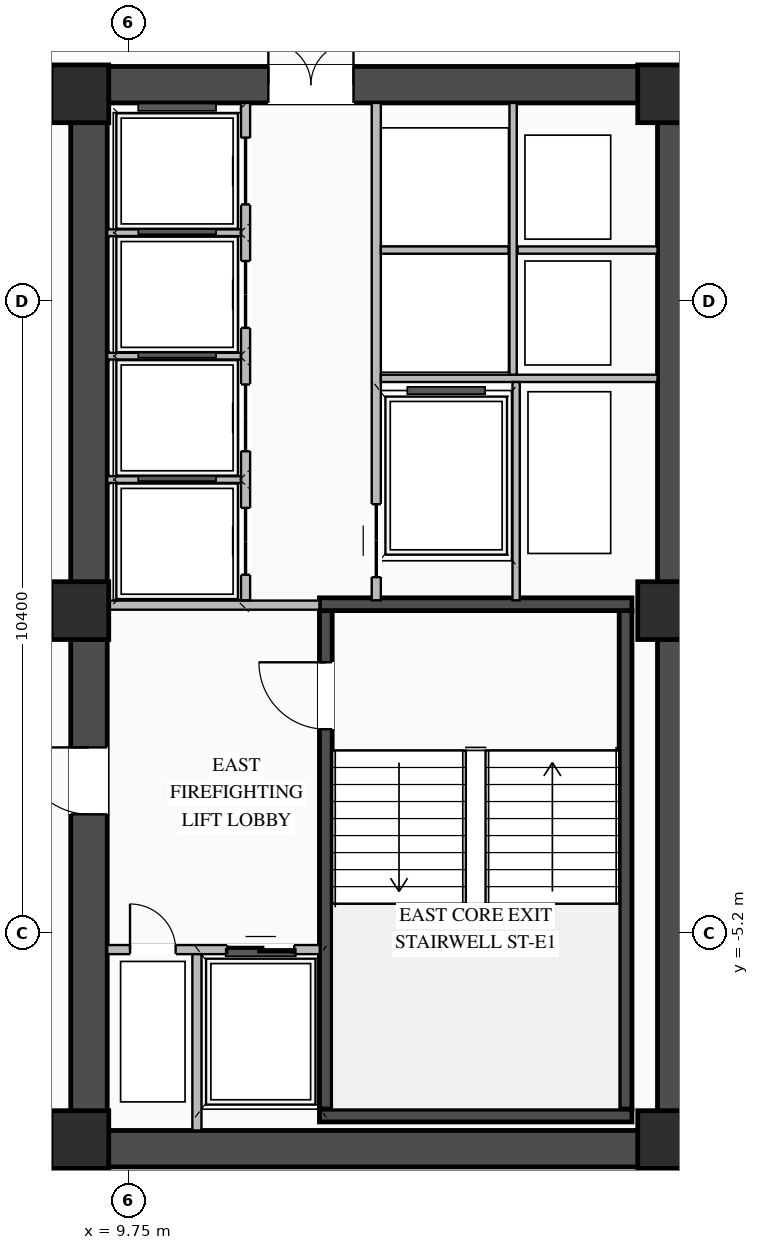
"""IFC4 building model, lengths in metres.
Left out: names, types, materials, properties, quantities, classifications, styles, units other than length and angle.
Written with IfcOpenShell. Run it as: python <this file> out.ifc"""

import sys

from ifc_helpers import new_model, si_unit, direction, frame, frame_2d, origin, origin_2d, place, context, subcontext, project, spatial, rectangle, extrude, element, fill, save


model = new_model("IFC4")
c1 = context("Model", 3, precision=1e-05, world=origin(), true_north=direction((0.0, 1.0)))
c2 = subcontext(c1, "Body", "Model", "MODEL_VIEW")
j1 = project(units=[si_unit("LENGTHUNIT", "METRE"), si_unit("PLANEANGLEUNIT", "RADIAN")], contexts=[c1])
p1 = place(None, origin())
s1 = spatial("IfcSite", under=j1, at=p1, CompositionType="ELEMENT")
p2 = place(p1, origin())
s2 = spatial("IfcBuilding", under=s1, at=p2, CompositionType="ELEMENT")
p3 = place(p2, frame((0.0, 0.0, 170.75)))
s3 = spatial("IfcBuildingStorey", under=s2, at=p3, CompositionType="ELEMENT", Elevation=170.75)
p4 = place(p3, frame((8.8, -8.75, 0.0), z_axis=(0.0, 0.0, 1.0), x_axis=(1.0, 0.0, 0.0)))
e1 = element("IfcWall", 1, at=p4, inside=s3, PredefinedType="SHEAR", context=c2, shape_type="SweptSolid", body=[
    extrude(rectangle(XDim=10.25, YDim=0.6, at=frame_2d((5.125, 0.0))), origin(), (0.0, 0.0, 1.0), 3.27),
])
p5 = place(p3, frame((8.8, 8.75, 0.0), z_axis=(0.0, 0.0, 1.0), x_axis=(1.0, 0.0, 0.0)))
e2 = element("IfcWall", 2, at=p5, inside=s3, PredefinedType="SHEAR", context=c2, shape_type="SweptSolid", body=[
    extrude(rectangle(XDim=10.25, YDim=0.6, at=frame_2d((5.125, 0.0))), origin(), (0.0, 0.0, 1.0), 3.27),
])
p6 = place(p5, frame((3.25, 0.0, 0.0)))
e3 = element("IfcOpeningElement", 3, at=p6, cuts=e2, PredefinedType="OPENING", context=c2, shape_type="SweptSolid", body=[
    extrude(rectangle(XDim=1.4, YDim=2.05, at=frame_2d((0.7, 1.025))), frame((0.0, 0.31, 0.0), z_axis=(0.0, -1.0, 0.0), x_axis=(1.0, 0.0, 0.0)), (0.0, 0.0, 1.0), 0.62),
])
p7 = place(p3, frame((9.1, -8.45, 0.0), z_axis=(0.0, 0.0, 1.0), x_axis=(0.0, 1.0, 0.0)))
e4 = element("IfcWall", 4, at=p7, inside=s3, PredefinedType="SHEAR", context=c2, shape_type="SweptSolid", body=[
    extrude(rectangle(XDim=16.9, YDim=0.6, at=frame_2d((8.45, 0.0))), origin(), (0.0, 0.0, 1.0), 3.27),
])
p8 = place(p7, frame((5.2, 0.0, 0.0)))
e5 = element("IfcOpeningElement", 5, at=p8, cuts=e4, PredefinedType="OPENING", context=c2, shape_type="SweptSolid", body=[
    extrude(rectangle(XDim=1.1, YDim=2.08, at=frame_2d((0.55, 1.04))), frame((0.0, 0.31, 0.0), z_axis=(0.0, -1.0, 0.0), x_axis=(1.0, 0.0, 0.0)), (0.0, 0.0, 1.0), 0.62),
])
p9 = place(p3, frame((18.75, -8.45, 0.0), z_axis=(0.0, 0.0, 1.0), x_axis=(0.0, 1.0, 0.0)))
e6 = element("IfcWall", 6, at=p9, inside=s3, PredefinedType="SHEAR", context=c2, shape_type="SweptSolid", body=[
    extrude(rectangle(XDim=16.9, YDim=0.6, at=frame_2d((8.45, 0.0))), origin(), (0.0, 0.0, 1.0), 3.27),
])
p10 = place(p3, frame((12.995, -8.1, 0.0), z_axis=(0.0, 0.0, 1.0), x_axis=(0.0, 1.0, 0.0)))
e7 = element("IfcWall", 7, at=p10, inside=s3, PredefinedType="SHEAR", context=c2, shape_type="SweptSolid", body=[
    extrude(rectangle(XDim=8.2, YDim=0.21, at=frame_2d((4.1, 0.0))), origin(), (0.0, 0.0, 1.0), 3.27),
])
p11 = place(p10, frame((6.25, 0.0, 0.0)))
e8 = element("IfcOpeningElement", 8, at=p11, cuts=e7, PredefinedType="OPENING", context=c2, shape_type="SweptSolid", body=[
    extrude(rectangle(XDim=1.1, YDim=2.15, at=frame_2d((0.55, 1.075))), frame((0.0, 0.115, 0.0), z_axis=(0.0, -1.0, 0.0), x_axis=(1.0, 0.0, 0.0)), (0.0, 0.0, 1.0), 0.23),
])
p12 = place(p3, frame((17.925, -8.1, 0.0), z_axis=(0.0, 0.0, 1.0), x_axis=(0.0, 1.0, 0.0)))
e9 = element("IfcWall", 9, at=p12, inside=s3, PredefinedType="SHEAR", context=c2, shape_type="SweptSolid", body=[
    extrude(rectangle(XDim=8.2, YDim=0.21, at=frame_2d((4.1, 0.0))), origin(), (0.0, 0.0, 1.0), 3.27),
])
for number, where, z_axis, x_axis in (
    (10, (12.89, -8.205, 0.0), (0.0, 0.0, 1.0), (1.0, 0.0, 0.0)),
    (11, (18.03, 0.205, 0.0), (0.0, 0.0, 1.0), (-1.0, 0.0, 0.0)),
):
    element("IfcWall", number, at=place(p3, frame(where, z_axis=z_axis, x_axis=x_axis)), inside=s3, PredefinedType="SHEAR", context=c2, shape_type="SweptSolid", body=[
        extrude(rectangle(XDim=5.14, YDim=0.21, at=frame_2d((2.57, 0.0))), origin(), (0.0, 0.0, 1.0), 3.27),
    ])
for number, where, z_axis, x_axis in (
    (12, (8.95, -8.6, 0.0), (0.0, 0.0, 1.0), (1.0, 0.0, 0.0)),
    (13, (8.95, 0.1, 0.0), (0.0, 0.0, 1.0), (1.0, 0.0, 0.0)),
    (14, (8.95, 8.6, 0.0), (0.0, 0.0, 1.0), (1.0, 0.0, 0.0)),
    (15, (18.6, -8.6, 0.0), (0.0, 0.0, 1.0), (1.0, 0.0, 0.0)),
    (16, (18.6, 0.1, 0.0), (0.0, 0.0, 1.0), (1.0, 0.0, 0.0)),
    (17, (18.6, 8.6, 0.0), (0.0, 0.0, 1.0), (1.0, 0.0, 0.0)),
):
    element("IfcColumn", number, at=place(p3, frame(where, z_axis=z_axis, x_axis=x_axis)), inside=s3, PredefinedType="COLUMN", context=c2, shape_type="SweptSolid", body=[
        extrude(rectangle(XDim=0.95, YDim=0.95, at=origin_2d()), origin(), (0.0, 0.0, 1.0), 3.45),
    ])
p13 = place(p3, frame((9.4, -5.475, 0.0), z_axis=(0.0, 0.0, 1.0), x_axis=(1.0, 0.0, 0.0)))
e18 = element("IfcWall", 18, at=p13, inside=s3, PredefinedType="STANDARD", context=c2, shape_type="SweptSolid", body=[
    extrude(rectangle(XDim=3.495, YDim=0.15, at=frame_2d((1.748, 0.0))), origin(), (0.0, 0.0, 1.0), 3.25),
])
p14 = place(p13, frame((1.975, 0.0, 0.0)))
e19 = element("IfcOpeningElement", 19, at=p14, cuts=e18, PredefinedType="OPENING", context=c2, shape_type="SweptSolid", body=[
    extrude(rectangle(XDim=1.1, YDim=2.15, at=frame_2d((0.55, 1.075))), frame((0.0, 0.085, 0.0), z_axis=(0.0, -1.0, 0.0), x_axis=(1.0, 0.0, 0.0)), (0.0, 0.0, 1.0), 0.17),
])
p15 = place(p13, frame((0.375, 0.0, 0.0)))
e20 = element("IfcOpeningElement", 20, at=p15, cuts=e18, PredefinedType="OPENING", context=c2, shape_type="SweptSolid", body=[
    extrude(rectangle(XDim=0.75, YDim=2.05, at=frame_2d((0.375, 1.025))), frame((0.0, 0.085, 0.0), z_axis=(0.0, -1.0, 0.0), x_axis=(1.0, 0.0, 0.0)), (0.0, 0.0, 1.0), 0.17),
])
p16 = place(p3, frame((10.875, -8.45, 0.0), z_axis=(0.0, 0.0, 1.0), x_axis=(0.0, 1.0, 0.0)))
e21 = element("IfcWall", 21, at=p16, inside=s3, PredefinedType="STANDARD", context=c2, shape_type="SweptSolid", body=[
    extrude(rectangle(XDim=2.9, YDim=0.15, at=frame_2d((1.45, 0.0))), origin(), (0.0, 0.0, 1.0), 3.25),
])
p17 = place(p3, frame((9.4, 0.19, 0.0), z_axis=(0.0, 0.0, 1.0), x_axis=(1.0, 0.0, 0.0)))
e22 = element("IfcWall", 22, at=p17, inside=s3, PredefinedType="STANDARD", context=c2, shape_type="SweptSolid", body=[
    extrude(rectangle(XDim=3.49, YDim=0.15, at=frame_2d((1.745, 0.0))), origin(), (0.0, 0.0, 1.0), 2.645),
])
p18 = place(p3, frame((11.675, 0.27, 0.0), z_axis=(0.0, 0.0, 1.0), x_axis=(0.0, 1.0, 0.0)))
e23 = element("IfcWall", 23, at=p18, inside=s3, PredefinedType="STANDARD", context=c2, shape_type="SweptSolid", body=[
    extrude(rectangle(XDim=8.18, YDim=0.15, at=frame_2d((4.09, 0.0))), origin(), (0.0, 0.0, 1.0), 3.25),
])
p19 = place(p18, frame((0.42, 0.0, 0.0)))
e24 = element("IfcOpeningElement", 24, at=p19, cuts=e23, PredefinedType="OPENING", context=c2, shape_type="SweptSolid", body=[
    extrude(rectangle(XDim=1.1, YDim=2.1, at=frame_2d((0.55, 1.05))), frame((0.0, 0.085, 0.0), z_axis=(0.0, -1.0, 0.0), x_axis=(1.0, 0.0, 0.0)), (0.0, 0.0, 1.0), 0.17),
])
p20 = place(p18, frame((2.45, 0.0, 0.0)))
e25 = element("IfcOpeningElement", 25, at=p20, cuts=e23, PredefinedType="OPENING", context=c2, shape_type="SweptSolid", body=[
    extrude(rectangle(XDim=1.1, YDim=2.1, at=frame_2d((0.55, 1.05))), frame((0.0, 0.085, 0.0), z_axis=(0.0, -1.0, 0.0), x_axis=(1.0, 0.0, 0.0)), (0.0, 0.0, 1.0), 0.17),
])
p21 = place(p18, frame((4.48, 0.0, 0.0)))
e26 = element("IfcOpeningElement", 26, at=p21, cuts=e23, PredefinedType="OPENING", context=c2, shape_type="SweptSolid", body=[
    extrude(rectangle(XDim=1.1, YDim=2.1, at=frame_2d((0.55, 1.05))), frame((0.0, 0.085, 0.0), z_axis=(0.0, -1.0, 0.0), x_axis=(1.0, 0.0, 0.0)), (0.0, 0.0, 1.0), 0.17),
])
p22 = place(p18, frame((6.51, 0.0, 0.0)))
e27 = element("IfcOpeningElement", 27, at=p22, cuts=e23, PredefinedType="OPENING", context=c2, shape_type="SweptSolid", body=[
    extrude(rectangle(XDim=1.1, YDim=2.1, at=frame_2d((0.55, 1.05))), frame((0.0, 0.085, 0.0), z_axis=(0.0, -1.0, 0.0), x_axis=(1.0, 0.0, 0.0)), (0.0, 0.0, 1.0), 0.17),
])
for number, where, z_axis, x_axis in (
    (28, (9.4, 2.255, 0.0), (0.0, 0.0, 1.0), (1.0, 0.0, 0.0)),
    (29, (9.4, 4.285, 0.0), (0.0, 0.0, 1.0), (1.0, 0.0, 0.0)),
    (30, (9.4, 6.315, 0.0), (0.0, 0.0, 1.0), (1.0, 0.0, 0.0)),
):
    element("IfcWall", number, at=place(p3, frame(where, z_axis=z_axis, x_axis=x_axis)), inside=s3, PredefinedType="STANDARD", context=c2, shape_type="SweptSolid", body=[
        extrude(rectangle(XDim=2.2, YDim=0.11, at=frame_2d((1.1, 0.0))), origin(), (0.0, 0.0, 1.0), 3.25),
    ])
p23 = place(p3, frame((13.825, 0.27, 0.0), z_axis=(0.0, 0.0, 1.0), x_axis=(0.0, 1.0, 0.0)))
e31 = element("IfcWall", 31, at=p23, inside=s3, PredefinedType="STANDARD", context=c2, shape_type="SweptSolid", body=[
    extrude(rectangle(XDim=8.18, YDim=0.15, at=frame_2d((4.09, 0.0))), origin(), (0.0, 0.0, 1.0), 3.25),
])
p24 = place(p23, frame((0.38, 0.0, 0.0)))
e32 = element("IfcOpeningElement", 32, at=p24, cuts=e31, PredefinedType="OPENING", context=c2, shape_type="SweptSolid", body=[
    extrude(rectangle(XDim=1.2, YDim=2.1, at=frame_2d((0.6, 1.05))), frame((0.0, 0.085, 0.0), z_axis=(0.0, -1.0, 0.0), x_axis=(1.0, 0.0, 0.0)), (0.0, 0.0, 1.0), 0.17),
])
p25 = place(p3, frame((13.9, 3.92, 0.0), z_axis=(0.0, 0.0, 1.0), x_axis=(1.0, 0.0, 0.0)))
e33 = element("IfcWall", 33, at=p25, inside=s3, PredefinedType="STANDARD", context=c2, shape_type="SweptSolid", body=[
    extrude(rectangle(XDim=4.55, YDim=0.12, at=frame_2d((2.275, 0.0))), origin(), (0.0, 0.0, 1.0), 3.25),
])
p26 = place(p3, frame((16.15, 6.03, 0.0), z_axis=(0.0, 0.0, 1.0), x_axis=(1.0, 0.0, 0.0)))
e34 = element("IfcWall", 34, at=p26, inside=s3, PredefinedType="STANDARD", context=c2, shape_type="SweptSolid", body=[
    extrude(rectangle(XDim=2.3, YDim=0.12, at=frame_2d((1.15, 0.0))), origin(), (0.0, 0.0, 1.0), 3.25),
])
p27 = place(p3, frame((16.075, 3.98, 0.0), z_axis=(0.0, 0.0, 1.0), x_axis=(0.0, 1.0, 0.0)))
e35 = element("IfcWall", 35, at=p27, inside=s3, PredefinedType="STANDARD", context=c2, shape_type="SweptSolid", body=[
    extrude(rectangle(XDim=4.47, YDim=0.12, at=frame_2d((2.235, 0.0))), origin(), (0.0, 0.0, 1.0), 3.25),
])
p28 = place(p3, frame((13.9, 6.03, 0.0), z_axis=(0.0, 0.0, 1.0), x_axis=(1.0, 0.0, 0.0)))
e36 = element("IfcWall", 36, at=p28, inside=s3, PredefinedType="STANDARD", context=c2, shape_type="SweptSolid", body=[
    extrude(rectangle(XDim=2.1, YDim=0.12, at=frame_2d((1.05, 0.0))), origin(), (0.0, 0.0, 1.0), 3.25),
])
p29 = place(p3, frame((16.125, 0.27, 0.0), z_axis=(0.0, 0.0, 1.0), x_axis=(0.0, 1.0, 0.0)))
e37 = element("IfcWall", 37, at=p29, inside=s3, PredefinedType="STANDARD", context=c2, shape_type="SweptSolid", body=[
    extrude(rectangle(XDim=3.59, YDim=0.12, at=frame_2d((1.795, 0.0))), origin(), (0.0, 0.0, 1.0), 3.25),
])
p30 = place(p11, origin())
e38 = element("IfcDoor", 38, at=p30, inside=s3, OperationType="SINGLE_SWING_RIGHT", PredefinedType="DOOR", context=c2, shape_type="SweptSolid", body=[
    extrude(rectangle(XDim=1.1, YDim=2.15, at=frame_2d((0.55, 1.075))), frame((0.0, 0.025, 0.0), z_axis=(0.0, -1.0, 0.0), x_axis=(1.0, 0.0, 0.0)), (0.0, 0.0, 1.0), 0.05),
])
fill(e8, e38)
p31 = place(p14, origin())
e39 = element("IfcDoor", 39, at=p31, inside=s3, OperationType="DOUBLE_DOOR_SLIDING", PredefinedType="DOOR", context=c2, shape_type="SweptSolid", body=[
    extrude(rectangle(XDim=1.1, YDim=2.15, at=frame_2d((0.55, 1.075))), frame((0.0, 0.025, 0.0), z_axis=(0.0, -1.0, 0.0), x_axis=(1.0, 0.0, 0.0)), (0.0, 0.0, 1.0), 0.05),
])
fill(e19, e39)
p32 = place(p15, origin())
e40 = element("IfcDoor", 40, at=p32, inside=s3, OperationType="SINGLE_SWING_LEFT", PredefinedType="DOOR", context=c2, shape_type="SweptSolid", body=[
    extrude(rectangle(XDim=0.75, YDim=2.05, at=frame_2d((0.375, 1.025))), frame((0.0, 0.025, 0.0), z_axis=(0.0, -1.0, 0.0), x_axis=(1.0, 0.0, 0.0)), (0.0, 0.0, 1.0), 0.05),
])
fill(e20, e40)
p33 = place(p8, origin())
e41 = element("IfcDoor", 41, at=p33, inside=s3, OperationType="SINGLE_SWING_RIGHT", PredefinedType="DOOR", context=c2, shape_type="SweptSolid", body=[
    extrude(rectangle(XDim=1.1, YDim=2.08, at=frame_2d((0.55, 1.04))), frame((0.0, -0.205, 0.0), z_axis=(0.0, -1.0, 0.0), x_axis=(1.0, 0.0, 0.0)), (0.0, 0.0, 1.0), 0.05),
])
fill(e5, e41)
p34 = place(p6, origin())
e42 = element("IfcDoor", 42, at=p34, inside=s3, OperationType="DOUBLE_DOOR_SINGLE_SWING", PredefinedType="DOOR", context=c2, shape_type="SweptSolid", body=[
    extrude(rectangle(XDim=1.4, YDim=2.05, at=frame_2d((0.7, 1.025))), frame((0.0, 0.245, 0.0), z_axis=(0.0, -1.0, 0.0), x_axis=(1.0, 0.0, 0.0)), (0.0, 0.0, 1.0), 0.05),
])
fill(e3, e42)
p35 = place(p19, origin())
e43 = element("IfcDoor", 43, at=p35, inside=s3, OperationType="DOUBLE_DOOR_SLIDING", PredefinedType="DOOR", context=c2, shape_type="SweptSolid", body=[
    extrude(rectangle(XDim=1.1, YDim=2.1, at=frame_2d((0.55, 1.05))), frame((0.0, 0.025, 0.0), z_axis=(0.0, -1.0, 0.0), x_axis=(1.0, 0.0, 0.0)), (0.0, 0.0, 1.0), 0.05),
])
fill(e24, e43)
p36 = place(p20, origin())
e44 = element("IfcDoor", 44, at=p36, inside=s3, OperationType="DOUBLE_DOOR_SLIDING", PredefinedType="DOOR", context=c2, shape_type="SweptSolid", body=[
    extrude(rectangle(XDim=1.1, YDim=2.1, at=frame_2d((0.55, 1.05))), frame((0.0, 0.025, 0.0), z_axis=(0.0, -1.0, 0.0), x_axis=(1.0, 0.0, 0.0)), (0.0, 0.0, 1.0), 0.05),
])
fill(e25, e44)
p37 = place(p21, origin())
e45 = element("IfcDoor", 45, at=p37, inside=s3, OperationType="DOUBLE_DOOR_SLIDING", PredefinedType="DOOR", context=c2, shape_type="SweptSolid", body=[
    extrude(rectangle(XDim=1.1, YDim=2.1, at=frame_2d((0.55, 1.05))), frame((0.0, 0.025, 0.0), z_axis=(0.0, -1.0, 0.0), x_axis=(1.0, 0.0, 0.0)), (0.0, 0.0, 1.0), 0.05),
])
fill(e26, e45)
p38 = place(p22, origin())
e46 = element("IfcDoor", 46, at=p38, inside=s3, OperationType="DOUBLE_DOOR_SLIDING", PredefinedType="DOOR", context=c2, shape_type="SweptSolid", body=[
    extrude(rectangle(XDim=1.1, YDim=2.1, at=frame_2d((0.55, 1.05))), frame((0.0, 0.025, 0.0), z_axis=(0.0, -1.0, 0.0), x_axis=(1.0, 0.0, 0.0)), (0.0, 0.0, 1.0), 0.05),
])
fill(e27, e46)
p39 = place(p24, origin())
e47 = element("IfcDoor", 47, at=p39, inside=s3, OperationType="DOUBLE_DOOR_SLIDING", PredefinedType="DOOR", context=c2, shape_type="SweptSolid", body=[
    extrude(rectangle(XDim=1.2, YDim=2.1, at=frame_2d((0.6, 1.05))), frame((0.0, 0.025, 0.0), z_axis=(0.0, -1.0, 0.0), x_axis=(1.0, 0.0, 0.0)), (0.0, 0.0, 1.0), 0.05),
])
fill(e32, e47)
save(model, sys.argv[1])
